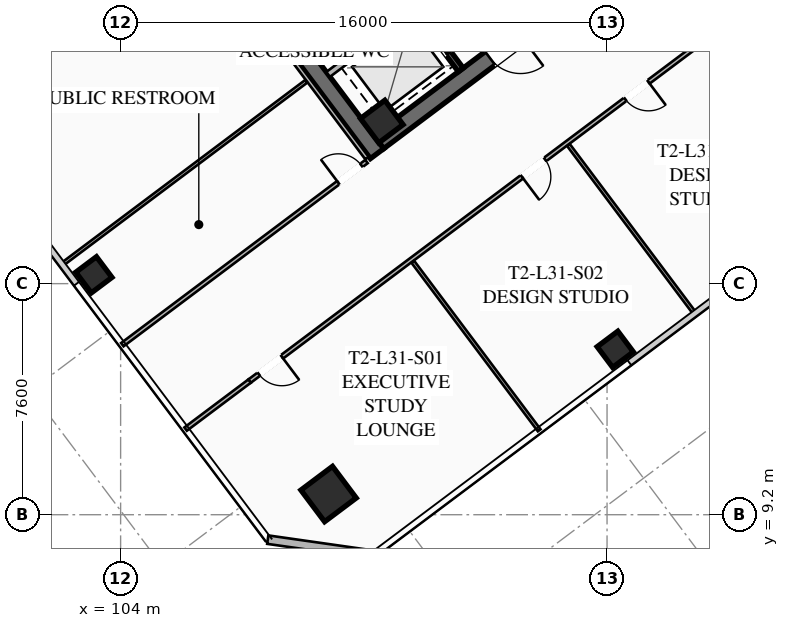
"""IFC4 building model, lengths in metres.
Left out: names, types, materials, properties, quantities, classifications, styles, units other than length and angle.
Written with IfcOpenShell. Run it as: python <this file> out.ifc"""

import sys

from ifc_helpers import new_model, si_unit, direction, frame, frame_2d, origin, origin_2d, place, context, subcontext, project, spatial, rectangle, hollow_rectangle, extrude, element, fill, save


model = new_model("IFC4")
c1 = context("Model", 3, precision=1e-05, world=origin(), true_north=direction((0.0, 1.0)))
c2 = subcontext(c1, "Body", "Model", "MODEL_VIEW")
j1 = project(units=[si_unit("LENGTHUNIT", "METRE"), si_unit("PLANEANGLEUNIT", "RADIAN")], contexts=[c1])
p1 = place(None, origin())
s1 = spatial("IfcSite", under=j1, at=p1, CompositionType="ELEMENT")
p2 = place(p1, origin())
s2 = spatial("IfcBuilding", under=s1, at=p2, CompositionType="ELEMENT")
p3 = place(p2, frame((0.0, 0.0, 117.95)))
s3 = spatial("IfcBuildingStorey", under=s2, at=p3, CompositionType="ELEMENT", Elevation=117.95)
p4 = place(p3, frame((112.436, 21.077, 0.0), z_axis=(0.0, 0.0, 1.0), x_axis=(-0.600005007985, 0.799996243986, 0.0)))
e1 = element("IfcWall", 1, at=p4, inside=s3, PredefinedType="SHEAR", context=c2, shape_type="SweptSolid", body=[
    extrude(rectangle(XDim=15.6, YDim=0.55, at=frame_2d((7.8, 0.0))), origin(), (0.0, 0.0, 1.0), 3.55),
])
p5 = place(p3, frame((124.539, 30.498, 0.0), z_axis=(0.0, 0.0, 1.0), x_axis=(-0.799998054672, -0.600002593761, 0.0)))
e2 = element("IfcWall", 2, at=p5, inside=s3, PredefinedType="SHEAR", context=c2, shape_type="SweptSolid", body=[
    extrude(rectangle(XDim=15.06, YDim=0.55, at=frame_2d((7.53, 0.0))), origin(), (0.0, 0.0, 1.0), 3.55),
])
p6 = place(p5, frame((9.23, 0.0, 0.0)))
e3 = element("IfcOpeningElement", 3, at=p6, cuts=e2, PredefinedType="OPENING", context=c2, shape_type="SweptSolid", body=[
    extrude(rectangle(XDim=1.25, YDim=2.25, at=frame_2d((0.625, 1.125))), frame((0.0, 0.285, 0.0), z_axis=(0.0, -1.0, 0.0), x_axis=(1.0, 0.0, 0.0)), (0.0, 0.0, 1.0), 0.57),
])
p7 = place(p5, frame((4.18, 0.0, 0.0)))
e4 = element("IfcOpeningElement", 4, at=p7, cuts=e2, PredefinedType="OPENING", context=c2, shape_type="SweptSolid", body=[
    extrude(rectangle(XDim=1.25, YDim=2.25, at=frame_2d((0.625, 1.125))), frame((0.0, 0.285, 0.0), z_axis=(0.0, -1.0, 0.0), x_axis=(1.0, 0.0, 0.0)), (0.0, 0.0, 1.0), 0.57),
])
p8 = place(p3, frame((112.59, 22.13, 0.0), z_axis=(0.0, 0.0, 1.0), x_axis=(0.799999996291, 0.600000004945, 0.0)))
e5 = element("IfcColumn", 5, at=p8, inside=s3, PredefinedType="COLUMN", context=c2, shape_type="SweptSolid", body=[
    extrude(hollow_rectangle(XDim=1.0, YDim=1.0, WallThickness=0.04, at=origin_2d()), origin(), (0.0, 0.0, 1.0), 3.37),
])
p9 = place(p3, frame((110.84, 9.88, 0.0), z_axis=(0.0, 0.0, 1.0), x_axis=(0.799999996291, 0.600000004945, 0.0)))
e6 = element("IfcColumn", 6, at=p9, inside=s3, PredefinedType="COLUMN", context=c2, shape_type="SweptSolid", body=[
    extrude(hollow_rectangle(XDim=1.3, YDim=1.3, WallThickness=0.05, at=origin_2d()), origin(), (0.0, 0.0, 1.0), 3.37),
])
for number, where, z_axis, x_axis in (
    (7, (120.27, 14.64, 0.0), (0.0, 0.0, 1.0), (0.8, 0.6, 0.0)),
    (8, (103.12, 17.09, 0.0), (0.0, 0.0, 1.0), (0.8, 0.6, 0.0)),
):
    element("IfcColumn", number, at=place(p3, frame(where, z_axis=z_axis, x_axis=x_axis)), inside=s3, PredefinedType="COLUMN", context=c2, shape_type="SweptSolid", body=[
        extrude(hollow_rectangle(XDim=0.85, YDim=0.85, WallThickness=0.035, at=origin_2d()), origin(), (0.0, 0.0, 1.0), 3.37),
    ])
p10 = place(p3, frame((112.34, 7.88, 0.0), z_axis=(0.0, 0.0, 1.0), x_axis=(-0.989949493661, 0.141421356237, 0.0)))
e9 = element("IfcWall", 9, at=p10, inside=s3, PredefinedType="SOLIDWALL", context=c2, shape_type="SweptSolid", body=[
    extrude(rectangle(XDim=3.536, YDim=0.28, at=frame_2d((1.768, 0.0))), origin(), (0.0, 0.0, 1.0), 3.37),
])
p11 = place(p3, frame((115.19, 23.83, 0.0), z_axis=(0.0, 0.0, 1.0), x_axis=(-0.599993943644, 0.800004542231, 0.0)))
e10 = element("IfcWall", 10, at=p11, inside=s3, PredefinedType="SHEAR", context=c2, shape_type="SweptSolid", body=[
    extrude(rectangle(XDim=6.45, YDim=0.2, at=frame_2d((3.225, 0.0))), origin(), (0.0, 0.0, 1.0), 3.37),
])
p12 = place(p11, frame((4.875, 0.0, 0.0)))
e11 = element("IfcOpeningElement", 11, at=p12, cuts=e10, PredefinedType="OPENING", context=c2, shape_type="SweptSolid", body=[
    extrude(rectangle(XDim=1.3, YDim=2.25, at=frame_2d((0.65, 1.125))), frame((0.0, 0.11, 0.0), z_axis=(0.0, -1.0, 0.0), x_axis=(1.0, 0.0, 0.0)), (0.0, 0.0, 1.0), 0.22),
])
p13 = place(p11, frame((2.875, 0.0, 0.0)))
e12 = element("IfcOpeningElement", 12, at=p13, cuts=e10, PredefinedType="OPENING", context=c2, shape_type="SweptSolid", body=[
    extrude(rectangle(XDim=1.3, YDim=2.25, at=frame_2d((0.65, 1.125))), frame((0.0, 0.11, 0.0), z_axis=(0.0, -1.0, 0.0), x_axis=(1.0, 0.0, 0.0)), (0.0, 0.0, 1.0), 0.22),
])
p14 = place(p11, frame((0.675, 0.0, 0.0)))
e13 = element("IfcOpeningElement", 13, at=p14, cuts=e10, PredefinedType="OPENING", context=c2, shape_type="SweptSolid", body=[
    extrude(rectangle(XDim=1.3, YDim=2.25, at=frame_2d((0.65, 1.125))), frame((0.0, 0.11, 0.0), z_axis=(0.0, -1.0, 0.0), x_axis=(1.0, 0.0, 0.0)), (0.0, 0.0, 1.0), 0.22),
])
p15 = place(p3, frame((110.826, 23.682, 0.0), z_axis=(0.0, 0.0, 1.0), x_axis=(0.8, 0.6, 0.0)))
e14 = element("IfcWall", 14, at=p15, inside=s3, PredefinedType="SOLIDWALL", context=c2, shape_type="SweptSolid", body=[
    extrude(rectangle(XDim=3.48, YDim=0.2, at=frame_2d((1.74, 0.0))), origin(), (0.0, 0.0, 1.0), 3.37),
])
p16 = place(p3, frame((133.282, 32.374, 0.0), z_axis=(0.0, 0.0, 1.0), x_axis=(-0.8, -0.6, 0.0)))
e15 = element("IfcWall", 15, at=p16, inside=s3, PredefinedType="PARTITIONING", context=c2, shape_type="SweptSolid", body=[
    extrude(rectangle(XDim=31.3, YDim=0.135, at=frame_2d((15.65, 0.0))), origin(), (0.0, 0.0, 1.0), 2.723),
])
p17 = place(p16, frame((29.97, 0.0, 0.0)))
e16 = element("IfcOpeningElement", 16, at=p17, cuts=e15, PredefinedType="OPENING", context=c2, shape_type="SweptSolid", body=[
    extrude(rectangle(XDim=0.95, YDim=2.05, at=frame_2d((0.475, 1.025))), frame((0.0, 0.077, 0.0), z_axis=(0.0, -1.0, 0.0), x_axis=(1.0, 0.0, 0.0)), (0.0, 0.0, 1.0), 0.155),
])
p18 = place(p16, frame((19.151, 0.0, 0.0)))
e17 = element("IfcOpeningElement", 17, at=p18, cuts=e15, PredefinedType="OPENING", context=c2, shape_type="SweptSolid", body=[
    extrude(rectangle(XDim=0.95, YDim=2.05, at=frame_2d((0.475, 1.025))), frame((0.0, 0.077, 0.0), z_axis=(0.0, -1.0, 0.0), x_axis=(1.0, 0.0, 0.0)), (0.0, 0.0, 1.0), 0.155),
])
p19 = place(p16, frame((14.901, 0.0, 0.0)))
e18 = element("IfcOpeningElement", 18, at=p19, cuts=e15, PredefinedType="OPENING", context=c2, shape_type="SweptSolid", body=[
    extrude(rectangle(XDim=0.95, YDim=2.05, at=frame_2d((0.475, 1.025))), frame((0.0, 0.077, 0.0), z_axis=(0.0, -1.0, 0.0), x_axis=(1.0, 0.0, 0.0)), (0.0, 0.0, 1.0), 0.155),
])
p20 = place(p16, frame((10.92, 0.0, 0.0)))
e19 = element("IfcOpeningElement", 19, at=p20, cuts=e15, PredefinedType="OPENING", context=c2, shape_type="SweptSolid", body=[
    extrude(rectangle(XDim=0.95, YDim=2.05, at=frame_2d((0.475, 1.025))), frame((0.0, 0.077, 0.0), z_axis=(0.0, -1.0, 0.0), x_axis=(1.0, 0.0, 0.0)), (0.0, 0.0, 1.0), 0.155),
])
p21 = place(p16, frame((0.38, 0.0, 0.0)))
e20 = element("IfcOpeningElement", 20, at=p21, cuts=e15, PredefinedType="OPENING", context=c2, shape_type="SweptSolid", body=[
    extrude(rectangle(XDim=0.95, YDim=2.05, at=frame_2d((0.475, 1.025))), frame((0.0, 0.077, 0.0), z_axis=(0.0, -1.0, 0.0), x_axis=(1.0, 0.0, 0.0)), (0.0, 0.0, 1.0), 0.155),
])
p22 = place(p3, frame((106.138, 12.016, 0.0), z_axis=(0.0, 0.0, 1.0), x_axis=(0.80002227902, 0.599970293491, 0.0)))
e21 = element("IfcWall", 21, at=p22, inside=s3, PredefinedType="PARTITIONING", context=c2, shape_type="SweptSolid", body=[
    extrude(rectangle(XDim=2.63, YDim=0.135, at=frame_2d((1.315, 0.0))), origin(), (0.0, 0.0, 1.0), 2.723),
])
p23 = place(p3, frame((117.768, 11.976, 0.0), z_axis=(0.0, 0.0, 1.0), x_axis=(-0.6, 0.8, 0.0)))
e22 = element("IfcWall", 22, at=p23, inside=s3, PredefinedType="PARTITIONING", context=c2, shape_type="SweptSolid", body=[
    extrude(rectangle(XDim=6.93, YDim=0.11, at=frame_2d((3.465, 0.0))), origin(), (0.0, 0.0, 1.0), 2.723),
])
p24 = place(p3, frame((122.888, 15.816, 0.0), z_axis=(0.0, 0.0, 1.0), x_axis=(-0.599983090003, 0.800012682219, 0.0)))
e23 = element("IfcWall", 23, at=p24, inside=s3, PredefinedType="PARTITIONING", context=c2, shape_type="SweptSolid", body=[
    extrude(rectangle(XDim=6.93, YDim=0.11, at=frame_2d((3.465, 0.0))), origin(), (0.0, 0.0, 1.0), 2.723),
])
p25 = place(p3, frame((112.104, 20.928, 0.0), z_axis=(0.0, 0.0, 1.0), x_axis=(-0.599994940075, 0.800003794918, 0.0)))
e24 = element("IfcWall", 24, at=p25, inside=s3, PredefinedType="PARTITIONING", context=c2, shape_type="SweptSolid", body=[
    extrude(rectangle(XDim=15.44, YDim=0.135, at=frame_2d((7.72, 0.0))), origin(), (0.0, 0.0, 1.0), 2.723),
])
p26 = place(p3, frame((104.056, 14.792, 0.0), z_axis=(0.0, 0.0, 1.0), x_axis=(0.800002918023, 0.599996109283, 0.0)))
e25 = element("IfcWall", 25, at=p26, inside=s3, PredefinedType="PARTITIONING", context=c2, shape_type="SweptSolid", body=[
    extrude(rectangle(XDim=10.04, YDim=0.135, at=frame_2d((5.02, 0.0))), origin(), (0.0, 0.0, 1.0), 2.723),
])
p27 = place(p26, frame((8.88, 0.0, 0.0)))
e26 = element("IfcOpeningElement", 26, at=p27, cuts=e25, PredefinedType="OPENING", context=c2, shape_type="SweptSolid", body=[
    extrude(rectangle(XDim=0.95, YDim=2.05, at=frame_2d((0.475, 1.025))), frame((0.0, 0.077, 0.0), z_axis=(0.0, -1.0, 0.0), x_axis=(1.0, 0.0, 0.0)), (0.0, 0.0, 1.0), 0.155),
])
p28 = place(p3, frame((102.076, 17.432, 0.0), z_axis=(0.0, 0.0, 1.0), x_axis=(0.799991245945, 0.600011671896, 0.0)))
e27 = element("IfcWall", 27, at=p28, inside=s3, PredefinedType="PARTITIONING", context=c2, shape_type="SweptSolid", body=[
    extrude(rectangle(XDim=10.04, YDim=0.11, at=frame_2d((5.02, 0.0))), origin(), (0.0, 0.0, 1.0), 2.723),
])
p29 = place(p6, origin())
e28 = element("IfcDoor", 28, at=p29, inside=s3, OperationType="SINGLE_SWING_LEFT", PredefinedType="DOOR", context=c2, shape_type="SweptSolid", body=[
    extrude(rectangle(XDim=1.25, YDim=2.25, at=frame_2d((0.625, 1.125))), frame((0.0, 0.025, 0.0), z_axis=(0.0, -1.0, 0.0), x_axis=(1.0, 0.0, 0.0)), (0.0, 0.0, 1.0), 0.05),
])
fill(e3, e28)
p30 = place(p17, origin())
e29 = element("IfcDoor", 29, at=p30, inside=s3, OperationType="SINGLE_SWING_LEFT", PredefinedType="DOOR", context=c2, shape_type="SweptSolid", body=[
    extrude(rectangle(XDim=0.95, YDim=2.05, at=frame_2d((0.475, 1.025))), frame((0.0, 0.025, 0.0), z_axis=(0.0, -1.0, 0.0), x_axis=(1.0, 0.0, 0.0)), (0.0, 0.0, 1.0), 0.05),
])
fill(e16, e29)
p31 = place(p18, origin())
e30 = element("IfcDoor", 30, at=p31, inside=s3, OperationType="SINGLE_SWING_RIGHT", PredefinedType="DOOR", context=c2, shape_type="SweptSolid", body=[
    extrude(rectangle(XDim=0.95, YDim=2.05, at=frame_2d((0.475, 1.025))), frame((0.0, 0.025, 0.0), z_axis=(0.0, -1.0, 0.0), x_axis=(1.0, 0.0, 0.0)), (0.0, 0.0, 1.0), 0.05),
])
fill(e17, e30)
p32 = place(p19, origin())
e31 = element("IfcDoor", 31, at=p32, inside=s3, OperationType="SINGLE_SWING_LEFT", PredefinedType="DOOR", context=c2, shape_type="SweptSolid", body=[
    extrude(rectangle(XDim=0.95, YDim=2.05, at=frame_2d((0.475, 1.025))), frame((0.0, 0.025, 0.0), z_axis=(0.0, -1.0, 0.0), x_axis=(1.0, 0.0, 0.0)), (0.0, 0.0, 1.0), 0.05),
])
fill(e18, e31)
p33 = place(p27, origin())
e32 = element("IfcDoor", 32, at=p33, inside=s3, OperationType="SINGLE_SWING_LEFT", PredefinedType="DOOR", context=c2, shape_type="SweptSolid", body=[
    extrude(rectangle(XDim=0.95, YDim=2.05, at=frame_2d((0.475, 1.025))), frame((0.0, 0.025, 0.0), z_axis=(0.0, -1.0, 0.0), x_axis=(1.0, 0.0, 0.0)), (0.0, 0.0, 1.0), 0.05),
])
fill(e26, e32)
p34 = place(p14, origin())
e33 = element("IfcDoor", 33, at=p34, inside=s3, OperationType="SLIDING_TO_LEFT", PredefinedType="DOOR", context=c2, shape_type="SweptSolid", body=[
    extrude(rectangle(XDim=1.3, YDim=2.25, at=frame_2d((0.65, 1.125))), frame((0.0, 0.025, 0.0), z_axis=(0.0, -1.0, 0.0), x_axis=(1.0, 0.0, 0.0)), (0.0, 0.0, 1.0), 0.05),
])
fill(e13, e33)
save(model, sys.argv[1])
